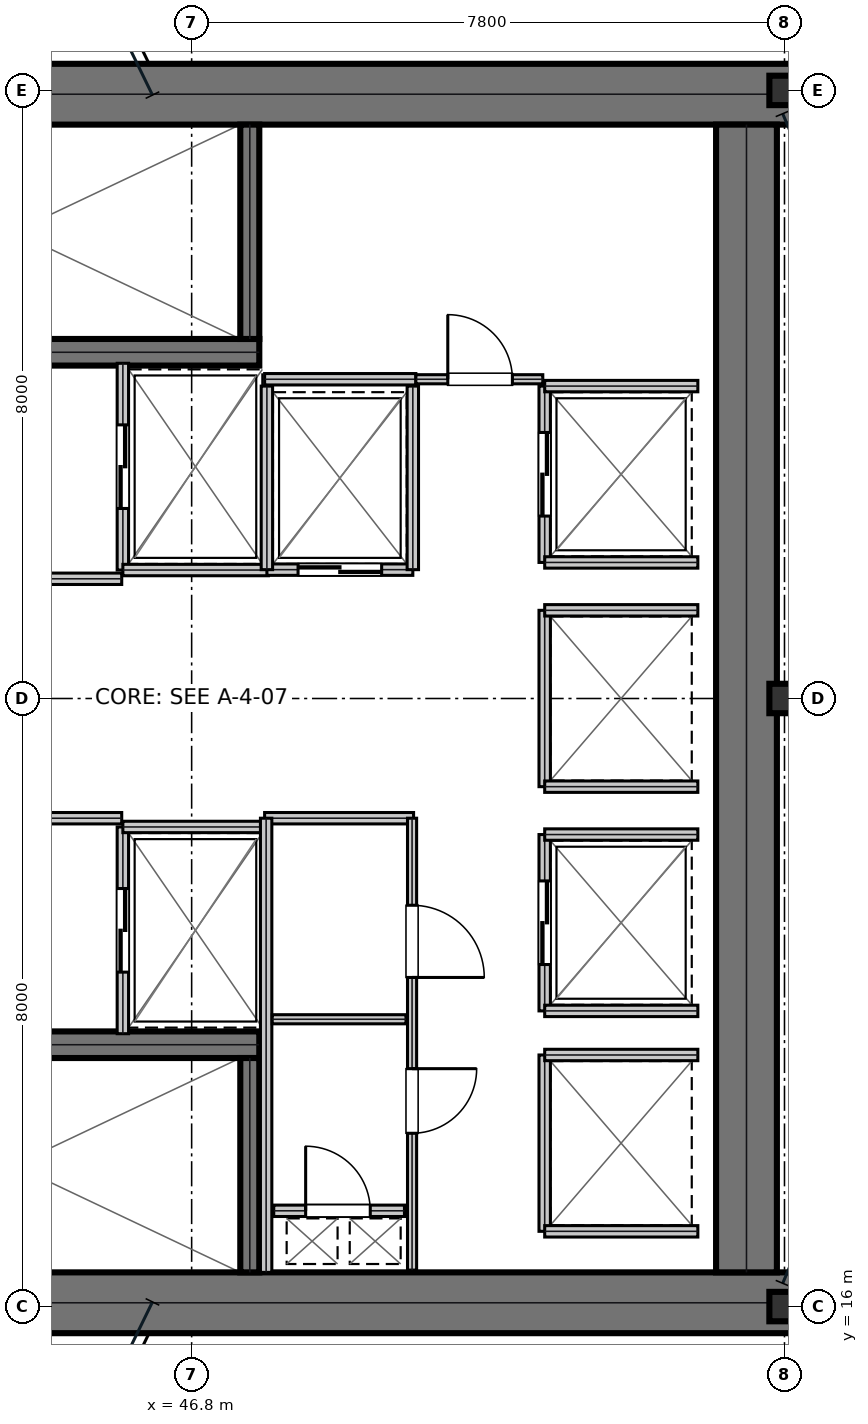
"""IFC4 building model, lengths in metres.
Left out: names, types, materials, properties, quantities, classifications, styles, units other than length and angle.
Written with IfcOpenShell. Run it as: python <this file> out.ifc"""

import sys

from ifc_helpers import new_model, si_unit, direction, frame, frame_2d, origin, origin_2d, place, context, subcontext, project, spatial, rectangle, i_section, extrude, element, fill, save


model = new_model("IFC4")
c1 = context("Model", 3, precision=1e-05, world=origin(), true_north=direction((0.0, 1.0)))
c2 = subcontext(c1, "Body", "Model", "MODEL_VIEW")
j1 = project(units=[si_unit("LENGTHUNIT", "METRE"), si_unit("PLANEANGLEUNIT", "RADIAN")], contexts=[c1])
p1 = place(None, origin())
s1 = spatial("IfcSite", under=j1, at=p1, CompositionType="ELEMENT")
p2 = place(p1, origin())
s2 = spatial("IfcBuilding", under=s1, at=p2, CompositionType="ELEMENT")
p3 = place(p2, frame((0.0, 0.0, 124.95)))
s3 = spatial("IfcBuildingStorey", under=s2, at=p3, CompositionType="ELEMENT", Elevation=124.95)
for number, where, z_axis, x_axis in (
    (1, (38.8, 31.95, 0.0), (0.0, 0.0, 1.0), (1.0, 0.0, 0.0)),
    (2, (38.8, 16.05, 0.0), (0.0, 0.0, 1.0), (1.0, 0.0, 0.0)),
):
    element("IfcWall", number, at=place(p3, frame(where, z_axis=z_axis, x_axis=x_axis)), inside=s3, PredefinedType="SHEAR", context=c2, shape_type="SweptSolid", body=[
        extrude(rectangle(XDim=16.0, YDim=0.8, at=frame_2d((8.0, 0.0))), origin(), (0.0, 0.0, 1.0), 3.81),
    ])
p4 = place(p3, frame((54.1, 16.45, 0.0), z_axis=(0.0, 0.0, 1.0), x_axis=(0.0, 1.0, 0.0)))
e3 = element("IfcWall", 3, at=p4, inside=s3, PredefinedType="SHEAR", context=c2, shape_type="SweptSolid", body=[
    extrude(rectangle(XDim=15.1, YDim=0.8, at=frame_2d((7.55, 0.0))), origin(), (0.0, 0.0, 1.0), 3.81),
])
p5 = place(p3, frame((39.98, 28.555, 0.0), z_axis=(0.0, 0.0, 1.0), x_axis=(1.0, 0.0, 0.0)))
e4 = element("IfcWall", 4, at=p5, inside=s3, PredefinedType="SHEAR", context=c2, shape_type="SweptSolid", body=[
    extrude(rectangle(XDim=7.71, YDim=0.35, at=frame_2d((3.855, 0.0))), origin(), (0.0, 0.0, 1.0), 3.81),
])
p6 = place(p5, frame((0.25, 0.0, 0.0)))
e5 = element("IfcOpeningElement", 5, at=p6, cuts=e4, PredefinedType="OPENING", context=c2, shape_type="SweptSolid", body=[
    extrude(rectangle(XDim=1.1, YDim=2.15, at=frame_2d((0.55, 1.075))), frame((0.0, 0.185, 0.0), z_axis=(0.0, -1.0, 0.0), x_axis=(1.0, 0.0, 0.0)), (0.0, 0.0, 1.0), 0.37),
])
p7 = place(p3, frame((39.98, 19.445, 0.0), z_axis=(0.0, 0.0, 1.0), x_axis=(1.0, 0.0, 0.0)))
e6 = element("IfcWall", 6, at=p7, inside=s3, PredefinedType="SHEAR", context=c2, shape_type="SweptSolid", body=[
    extrude(rectangle(XDim=7.71, YDim=0.35, at=frame_2d((3.855, 0.0))), origin(), (0.0, 0.0, 1.0), 3.81),
])
p8 = place(p7, frame((0.25, 0.0, 0.0)))
e7 = element("IfcOpeningElement", 7, at=p8, cuts=e6, PredefinedType="OPENING", context=c2, shape_type="SweptSolid", body=[
    extrude(rectangle(XDim=1.1, YDim=2.15, at=frame_2d((0.55, 1.075))), frame((0.0, 0.185, 0.0), z_axis=(0.0, -1.0, 0.0), x_axis=(1.0, 0.0, 0.0)), (0.0, 0.0, 1.0), 0.37),
])
for number, where, z_axis, x_axis in (
    (8, (47.565, 28.73, 0.0), (0.0, 0.0, 1.0), (0.0, 1.0, 0.0)),
    (9, (47.565, 16.45, 0.0), (0.0, 0.0, 1.0), (0.0, 1.0, 0.0)),
):
    element("IfcWall", number, at=place(p3, frame(where, z_axis=z_axis, x_axis=x_axis)), inside=s3, PredefinedType="SHEAR", context=c2, shape_type="SweptSolid", body=[
        extrude(rectangle(XDim=2.82, YDim=0.25, at=frame_2d((1.41, 0.0))), origin(), (0.0, 0.0, 1.0), 3.81),
    ])
for number, where, z_axis, x_axis in (
    (10, (54.6, 16.0, 0.0), (0.0, 0.0, 1.0), (1.0, 0.0, 0.0)),
    (11, (54.6, 24.0, 0.0), (0.0, 0.0, 1.0), (1.0, 0.0, 0.0)),
    (12, (54.6, 32.0, 0.0), (0.0, 0.0, 1.0), (1.0, 0.0, 0.0)),
):
    element("IfcColumn", number, at=place(p3, frame(where, z_axis=z_axis, x_axis=x_axis)), inside=s3, PredefinedType="COLUMN", context=c2, shape_type="SweptSolid", body=[
        extrude(i_section(OverallWidth=0.398, OverallDepth=0.387, WebThickness=0.021, FlangeThickness=0.033, at=origin_2d()), origin(), (0.0, 0.0, 1.0), 4.044),
    ])
p9 = place(p3, frame((39.98, 25.575, 0.0), z_axis=(0.0, 0.0, 1.0), x_axis=(1.0, 0.0, 0.0)))
e13 = element("IfcWall", 13, at=p9, inside=s3, PredefinedType="PARTITIONING", context=c2, shape_type="SweptSolid", body=[
    extrude(rectangle(XDim=5.9, YDim=0.15, at=frame_2d((2.95, 0.0))), origin(), (0.0, 0.0, 1.0), 3.81),
])
p10 = place(p9, frame((2.35, 0.0, 0.0)))
e14 = element("IfcOpeningElement", 14, at=p10, cuts=e13, PredefinedType="OPENING", context=c2, shape_type="SweptSolid", body=[
    extrude(rectangle(XDim=1.05, YDim=2.15, at=frame_2d((0.525, 1.075))), frame((0.0, 0.085, 0.0), z_axis=(0.0, -1.0, 0.0), x_axis=(1.0, 0.0, 0.0)), (0.0, 0.0, 1.0), 0.17),
])
p11 = place(p3, frame((39.98, 22.425, 0.0), z_axis=(0.0, 0.0, 1.0), x_axis=(1.0, 0.0, 0.0)))
e15 = element("IfcWall", 15, at=p11, inside=s3, PredefinedType="PARTITIONING", context=c2, shape_type="SweptSolid", body=[
    extrude(rectangle(XDim=5.9, YDim=0.15, at=frame_2d((2.95, 0.0))), origin(), (0.0, 0.0, 1.0), 3.81),
])
p12 = place(p11, frame((2.35, 0.0, 0.0)))
e16 = element("IfcOpeningElement", 16, at=p12, cuts=e15, PredefinedType="OPENING", context=c2, shape_type="SweptSolid", body=[
    extrude(rectangle(XDim=1.05, YDim=2.15, at=frame_2d((0.525, 1.075))), frame((0.0, 0.085, 0.0), z_axis=(0.0, -1.0, 0.0), x_axis=(1.0, 0.0, 0.0)), (0.0, 0.0, 1.0), 0.17),
])
p13 = place(p3, frame((45.895, 25.69, 0.0), z_axis=(0.0, 0.0, 1.0), x_axis=(0.0, 1.0, 0.0)))
e17 = element("IfcWall", 17, at=p13, inside=s3, PredefinedType="PARTITIONING", context=c2, shape_type="SweptSolid", body=[
    extrude(rectangle(XDim=2.72, YDim=0.15, at=frame_2d((1.36, 0.0))), origin(), (0.0, 0.0, 1.0), 3.81),
])
p14 = place(p13, frame((0.81, 0.0, 0.0)))
e18 = element("IfcOpeningElement", 18, at=p14, cuts=e17, PredefinedType="OPENING", context=c2, shape_type="SweptSolid", body=[
    extrude(rectangle(XDim=1.1, YDim=2.15, at=frame_2d((0.55, 1.075))), frame((0.0, 0.085, 0.0), z_axis=(0.0, -1.0, 0.0), x_axis=(1.0, 0.0, 0.0)), (0.0, 0.0, 1.0), 0.17),
])
p15 = place(p3, frame((45.895, 25.69, 0.0), z_axis=(0.0, 0.0, 1.0), x_axis=(1.0, 0.0, 0.0)))
e19 = element("IfcWall", 19, at=p15, inside=s3, PredefinedType="PARTITIONING", context=c2, shape_type="SweptSolid", body=[
    extrude(rectangle(XDim=1.915, YDim=0.15, at=frame_2d((0.958, 0.0))), origin(), (0.0, 0.0, 1.0), 3.81),
])
p16 = place(p3, frame((45.895, 19.59, 0.0), z_axis=(0.0, 0.0, 1.0), x_axis=(0.0, 1.0, 0.0)))
e20 = element("IfcWall", 20, at=p16, inside=s3, PredefinedType="PARTITIONING", context=c2, shape_type="SweptSolid", body=[
    extrude(rectangle(XDim=2.72, YDim=0.15, at=frame_2d((1.36, 0.0))), origin(), (0.0, 0.0, 1.0), 3.81),
])
p17 = place(p16, frame((0.81, 0.0, 0.0)))
e21 = element("IfcOpeningElement", 21, at=p17, cuts=e20, PredefinedType="OPENING", context=c2, shape_type="SweptSolid", body=[
    extrude(rectangle(XDim=1.1, YDim=2.15, at=frame_2d((0.55, 1.075))), frame((0.0, 0.085, 0.0), z_axis=(0.0, -1.0, 0.0), x_axis=(1.0, 0.0, 0.0)), (0.0, 0.0, 1.0), 0.17),
])
p18 = place(p3, frame((45.895, 22.31, 0.0), z_axis=(0.0, 0.0, 1.0), x_axis=(1.0, 0.0, 0.0)))
e22 = element("IfcWall", 22, at=p18, inside=s3, PredefinedType="PARTITIONING", context=c2, shape_type="SweptSolid", body=[
    extrude(rectangle(XDim=1.915, YDim=0.15, at=frame_2d((0.958, 0.0))), origin(), (0.0, 0.0, 1.0), 3.81),
])
p19 = place(p3, frame((47.79, 25.695, 0.0), z_axis=(0.0, 0.0, 1.0), x_axis=(1.0, 0.0, 0.0)))
e23 = element("IfcWall", 23, at=p19, inside=s3, PredefinedType="PARTITIONING", context=c2, shape_type="SweptSolid", body=[
    extrude(rectangle(XDim=1.92, YDim=0.15, at=frame_2d((0.96, 0.0))), origin(), (0.0, 0.0, 1.0), 3.81),
])
p20 = place(p19, frame((0.41, 0.0, 0.0)))
e24 = element("IfcOpeningElement", 24, at=p20, cuts=e23, PredefinedType="OPENING", context=c2, shape_type="SweptSolid", body=[
    extrude(rectangle(XDim=1.1, YDim=2.15, at=frame_2d((0.55, 1.075))), frame((0.0, 0.085, 0.0), z_axis=(0.0, -1.0, 0.0), x_axis=(1.0, 0.0, 0.0)), (0.0, 0.0, 1.0), 0.17),
])
for number, where, z_axis, x_axis in (
    (25, (47.79, 25.695, 0.0), (0.0, 0.0, 1.0), (0.0, 1.0, 0.0)),
    (26, (49.71, 25.695, 0.0), (0.0, 0.0, 1.0), (0.0, 1.0, 0.0)),
):
    element("IfcWall", number, at=place(p3, frame(where, z_axis=z_axis, x_axis=x_axis)), inside=s3, PredefinedType="PARTITIONING", context=c2, shape_type="SweptSolid", body=[
        extrude(rectangle(XDim=2.415, YDim=0.15, at=frame_2d((1.208, 0.0))), origin(), (0.0, 0.0, 1.0), 3.81),
    ])
p21 = place(p3, frame((51.445, 25.79, 0.0), z_axis=(0.0, 0.0, 1.0), x_axis=(0.0, 1.0, 0.0)))
e27 = element("IfcWall", 27, at=p21, inside=s3, PredefinedType="PARTITIONING", context=c2, shape_type="SweptSolid", body=[
    extrude(rectangle(XDim=2.32, YDim=0.15, at=frame_2d((1.16, 0.0))), origin(), (0.0, 0.0, 1.0), 3.81),
])
p22 = place(p21, frame((0.61, 0.0, 0.0)))
e28 = element("IfcOpeningElement", 28, at=p22, cuts=e27, PredefinedType="OPENING", context=c2, shape_type="SweptSolid", body=[
    extrude(rectangle(XDim=1.1, YDim=2.15, at=frame_2d((0.55, 1.075))), frame((0.0, 0.085, 0.0), z_axis=(0.0, -1.0, 0.0), x_axis=(1.0, 0.0, 0.0)), (0.0, 0.0, 1.0), 0.17),
])
for number, where, z_axis, x_axis in (
    (29, (51.445, 25.79, 0.0), (0.0, 0.0, 1.0), (1.0, 0.0, 0.0)),
    (30, (51.445, 28.11, 0.0), (0.0, 0.0, 1.0), (1.0, 0.0, 0.0)),
):
    element("IfcWall", number, at=place(p3, frame(where, z_axis=z_axis, x_axis=x_axis)), inside=s3, PredefinedType="PARTITIONING", context=c2, shape_type="SweptSolid", body=[
        extrude(rectangle(XDim=2.015, YDim=0.15, at=frame_2d((1.007, 0.0))), origin(), (0.0, 0.0, 1.0), 3.81),
    ])
p23 = place(p3, frame((51.445, 19.89, 0.0), z_axis=(0.0, 0.0, 1.0), x_axis=(0.0, 1.0, 0.0)))
e31 = element("IfcWall", 31, at=p23, inside=s3, PredefinedType="PARTITIONING", context=c2, shape_type="SweptSolid", body=[
    extrude(rectangle(XDim=2.32, YDim=0.15, at=frame_2d((1.16, 0.0))), origin(), (0.0, 0.0, 1.0), 3.81),
])
p24 = place(p23, frame((0.61, 0.0, 0.0)))
e32 = element("IfcOpeningElement", 32, at=p24, cuts=e31, PredefinedType="OPENING", context=c2, shape_type="SweptSolid", body=[
    extrude(rectangle(XDim=1.1, YDim=2.15, at=frame_2d((0.55, 1.075))), frame((0.0, 0.085, 0.0), z_axis=(0.0, -1.0, 0.0), x_axis=(1.0, 0.0, 0.0)), (0.0, 0.0, 1.0), 0.17),
])
for number, where, z_axis, x_axis in (
    (33, (51.445, 19.89, 0.0), (0.0, 0.0, 1.0), (1.0, 0.0, 0.0)),
    (34, (51.445, 22.21, 0.0), (0.0, 0.0, 1.0), (1.0, 0.0, 0.0)),
):
    element("IfcWall", number, at=place(p3, frame(where, z_axis=z_axis, x_axis=x_axis)), inside=s3, PredefinedType="PARTITIONING", context=c2, shape_type="SweptSolid", body=[
        extrude(rectangle(XDim=2.015, YDim=0.15, at=frame_2d((1.007, 0.0))), origin(), (0.0, 0.0, 1.0), 3.81),
    ])
p25 = place(p3, frame((51.445, 22.84, 0.0), z_axis=(0.0, 0.0, 1.0), x_axis=(0.0, 1.0, 0.0)))
e35 = element("IfcWall", 35, at=p25, inside=s3, PredefinedType="PARTITIONING", context=c2, shape_type="SweptSolid", body=[
    extrude(rectangle(XDim=2.32, YDim=0.15, at=frame_2d((1.16, 0.0))), origin(), (0.0, 0.0, 1.0), 3.81),
])
for number, where, z_axis, x_axis in (
    (36, (51.445, 22.84, 0.0), (0.0, 0.0, 1.0), (1.0, 0.0, 0.0)),
    (37, (51.445, 25.16, 0.0), (0.0, 0.0, 1.0), (1.0, 0.0, 0.0)),
):
    element("IfcWall", number, at=place(p3, frame(where, z_axis=z_axis, x_axis=x_axis)), inside=s3, PredefinedType="PARTITIONING", context=c2, shape_type="SweptSolid", body=[
        extrude(rectangle(XDim=2.015, YDim=0.15, at=frame_2d((1.007, 0.0))), origin(), (0.0, 0.0, 1.0), 3.81),
    ])
p26 = place(p3, frame((51.445, 16.99, 0.0), z_axis=(0.0, 0.0, 1.0), x_axis=(0.0, 1.0, 0.0)))
e38 = element("IfcWall", 38, at=p26, inside=s3, PredefinedType="PARTITIONING", context=c2, shape_type="SweptSolid", body=[
    extrude(rectangle(XDim=2.32, YDim=0.15, at=frame_2d((1.16, 0.0))), origin(), (0.0, 0.0, 1.0), 3.81),
])
for number, where, z_axis, x_axis in (
    (39, (51.445, 16.99, 0.0), (0.0, 0.0, 1.0), (1.0, 0.0, 0.0)),
    (40, (51.445, 19.31, 0.0), (0.0, 0.0, 1.0), (1.0, 0.0, 0.0)),
):
    element("IfcWall", number, at=place(p3, frame(where, z_axis=z_axis, x_axis=x_axis)), inside=s3, PredefinedType="PARTITIONING", context=c2, shape_type="SweptSolid", body=[
        extrude(rectangle(XDim=2.015, YDim=0.15, at=frame_2d((1.007, 0.0))), origin(), (0.0, 0.0, 1.0), 3.81),
    ])
p27 = place(p3, frame((47.88, 17.26, 0.0), z_axis=(0.0, 0.0, 1.0), x_axis=(1.0, 0.0, 0.0)))
e41 = element("IfcWall", 41, at=p27, inside=s3, PredefinedType="PARTITIONING", context=c2, shape_type="SweptSolid", body=[
    extrude(rectangle(XDim=1.72, YDim=0.15, at=frame_2d((0.86, 0.0))), origin(), (0.0, 0.0, 1.0), 3.81),
])
p28 = place(p27, frame((0.42, 0.0, 0.0)))
e42 = element("IfcOpeningElement", 42, at=p28, cuts=e41, PredefinedType="OPENING", context=c2, shape_type="SweptSolid", body=[
    extrude(rectangle(XDim=0.85, YDim=2.15, at=frame_2d((0.425, 1.075))), frame((0.0, 0.085, 0.0), z_axis=(0.0, -1.0, 0.0), x_axis=(1.0, 0.0, 0.0)), (0.0, 0.0, 1.0), 0.17),
])
p29 = place(p3, frame((47.76, 22.425, 0.0), z_axis=(0.0, 0.0, 1.0), x_axis=(1.0, 0.0, 0.0)))
e43 = element("IfcWall", 43, at=p29, inside=s3, PredefinedType="PARTITIONING", context=c2, shape_type="SweptSolid", body=[
    extrude(rectangle(XDim=1.96, YDim=0.15, at=frame_2d((0.98, 0.0))), origin(), (0.0, 0.0, 1.0), 3.81),
])
p30 = place(p3, frame((47.78, 16.45, 0.0), z_axis=(0.0, 0.0, 1.0), x_axis=(0.0, 1.0, 0.0)))
e44 = element("IfcWall", 44, at=p30, inside=s3, PredefinedType="PARTITIONING", context=c2, shape_type="SweptSolid", body=[
    extrude(rectangle(XDim=5.975, YDim=0.15, at=frame_2d((2.988, 0.0))), origin(), (0.0, 0.0, 1.0), 3.81),
])
p31 = place(p3, frame((47.86, 19.78, 0.0), z_axis=(0.0, 0.0, 1.0), x_axis=(1.0, 0.0, 0.0)))
e45 = element("IfcWall", 45, at=p31, inside=s3, PredefinedType="PARTITIONING", context=c2, shape_type="SweptSolid", body=[
    extrude(rectangle(XDim=1.76, YDim=0.12, at=frame_2d((0.88, 0.0))), origin(), (0.0, 0.0, 1.0), 3.81),
])
p32 = place(p3, frame((49.7, 16.48, 0.0), z_axis=(0.0, 0.0, 1.0), x_axis=(0.0, 1.0, 0.0)))
e46 = element("IfcWall", 46, at=p32, inside=s3, PredefinedType="PARTITIONING", context=c2, shape_type="SweptSolid", body=[
    extrude(rectangle(XDim=5.945, YDim=0.12, at=frame_2d((2.973, 0.0))), origin(), (0.0, 0.0, 1.0), 3.81),
])
p33 = place(p32, frame((1.8, 0.0, 0.0)))
e47 = element("IfcOpeningElement", 47, at=p33, cuts=e46, PredefinedType="OPENING", context=c2, shape_type="SweptSolid", body=[
    extrude(rectangle(XDim=0.85, YDim=2.15, at=frame_2d((0.425, 1.075))), frame((0.0, 0.07, 0.0), z_axis=(0.0, -1.0, 0.0), x_axis=(1.0, 0.0, 0.0)), (0.0, 0.0, 1.0), 0.14),
])
p34 = place(p32, frame((3.85, 0.0, 0.0)))
e48 = element("IfcOpeningElement", 48, at=p34, cuts=e46, PredefinedType="OPENING", context=c2, shape_type="SweptSolid", body=[
    extrude(rectangle(XDim=0.95, YDim=2.15, at=frame_2d((0.475, 1.075))), frame((0.0, 0.07, 0.0), z_axis=(0.0, -1.0, 0.0), x_axis=(1.0, 0.0, 0.0)), (0.0, 0.0, 1.0), 0.14),
])
p35 = place(p3, frame((47.76, 28.2, 0.0), z_axis=(0.0, 0.0, 1.0), x_axis=(1.0, 0.0, 0.0)))
e49 = element("IfcWall", 49, at=p35, inside=s3, PredefinedType="PARTITIONING", context=c2, shape_type="SweptSolid", body=[
    extrude(rectangle(XDim=1.99, YDim=0.15, at=frame_2d((0.995, 0.0))), origin(), (0.0, 0.0, 1.0), 3.81),
])
p36 = place(p3, frame((49.75, 28.2, 0.0), z_axis=(0.0, 0.0, 1.0), x_axis=(1.0, 0.0, 0.0)))
e50 = element("IfcWall", 50, at=p36, inside=s3, PredefinedType="PARTITIONING", context=c2, shape_type="SweptSolid", body=[
    extrude(rectangle(XDim=1.67, YDim=0.12, at=frame_2d((0.835, 0.0))), origin(), (0.0, 0.0, 1.0), 3.81),
])
p37 = place(p36, frame((0.42, 0.0, 0.0)))
e51 = element("IfcOpeningElement", 51, at=p37, cuts=e50, PredefinedType="OPENING", context=c2, shape_type="SweptSolid", body=[
    extrude(rectangle(XDim=0.85, YDim=2.15, at=frame_2d((0.425, 1.075))), frame((0.0, 0.07, 0.0), z_axis=(0.0, -1.0, 0.0), x_axis=(1.0, 0.0, 0.0)), (0.0, 0.0, 1.0), 0.14),
])
p38 = place(p14, frame((1.1, 0.0, 0.0), z_axis=(0.0, 0.0, 1.0), x_axis=(-1.0, 0.0, 0.0)))
e52 = element("IfcDoor", 52, at=p38, inside=s3, OperationType="DOUBLE_DOOR_SLIDING", PredefinedType="DOOR", context=c2, shape_type="SweptSolid", body=[
    extrude(rectangle(XDim=1.1, YDim=2.15, at=frame_2d((0.55, 1.075))), frame((0.0, 0.025, 0.0), z_axis=(0.0, -1.0, 0.0), x_axis=(1.0, 0.0, 0.0)), (0.0, 0.0, 1.0), 0.05),
])
fill(e18, e52)
p39 = place(p17, frame((1.1, 0.0, 0.0), z_axis=(0.0, 0.0, 1.0), x_axis=(-1.0, 0.0, 0.0)))
e53 = element("IfcDoor", 53, at=p39, inside=s3, OperationType="DOUBLE_DOOR_SLIDING", PredefinedType="DOOR", context=c2, shape_type="SweptSolid", body=[
    extrude(rectangle(XDim=1.1, YDim=2.15, at=frame_2d((0.55, 1.075))), frame((0.0, 0.025, 0.0), z_axis=(0.0, -1.0, 0.0), x_axis=(1.0, 0.0, 0.0)), (0.0, 0.0, 1.0), 0.05),
])
fill(e21, e53)
p40 = place(p20, frame((1.1, 0.0, 0.0), z_axis=(0.0, 0.0, 1.0), x_axis=(-1.0, 0.0, 0.0)))
e54 = element("IfcDoor", 54, at=p40, inside=s3, OperationType="DOUBLE_DOOR_SLIDING", PredefinedType="DOOR", context=c2, shape_type="SweptSolid", body=[
    extrude(rectangle(XDim=1.1, YDim=2.15, at=frame_2d((0.55, 1.075))), frame((0.0, 0.025, 0.0), z_axis=(0.0, -1.0, 0.0), x_axis=(1.0, 0.0, 0.0)), (0.0, 0.0, 1.0), 0.05),
])
fill(e24, e54)
p41 = place(p22, frame((1.1, 0.0, 0.0), z_axis=(0.0, 0.0, 1.0), x_axis=(-1.0, 0.0, 0.0)))
e55 = element("IfcDoor", 55, at=p41, inside=s3, OperationType="DOUBLE_DOOR_SLIDING", PredefinedType="DOOR", context=c2, shape_type="SweptSolid", body=[
    extrude(rectangle(XDim=1.1, YDim=2.15, at=frame_2d((0.55, 1.075))), frame((0.0, 0.025, 0.0), z_axis=(0.0, -1.0, 0.0), x_axis=(1.0, 0.0, 0.0)), (0.0, 0.0, 1.0), 0.05),
])
fill(e28, e55)
p42 = place(p24, frame((1.1, 0.0, 0.0), z_axis=(0.0, 0.0, 1.0), x_axis=(-1.0, 0.0, 0.0)))
e56 = element("IfcDoor", 56, at=p42, inside=s3, OperationType="DOUBLE_DOOR_SLIDING", PredefinedType="DOOR", context=c2, shape_type="SweptSolid", body=[
    extrude(rectangle(XDim=1.1, YDim=2.15, at=frame_2d((0.55, 1.075))), frame((0.0, 0.025, 0.0), z_axis=(0.0, -1.0, 0.0), x_axis=(1.0, 0.0, 0.0)), (0.0, 0.0, 1.0), 0.05),
])
fill(e32, e56)
p43 = place(p28, origin())
e57 = element("IfcDoor", 57, at=p43, inside=s3, OperationType="SINGLE_SWING_LEFT", PredefinedType="TRAPDOOR", context=c2, shape_type="SweptSolid", body=[
    extrude(rectangle(XDim=0.85, YDim=2.15, at=frame_2d((0.425, 1.075))), frame((0.0, 0.025, 0.0), z_axis=(0.0, -1.0, 0.0), x_axis=(1.0, 0.0, 0.0)), (0.0, 0.0, 1.0), 0.05),
])
fill(e42, e57)
p44 = place(p33, frame((0.85, 0.0, 0.0), z_axis=(0.0, 0.0, 1.0), x_axis=(-1.0, 0.0, 0.0)))
e58 = element("IfcDoor", 58, at=p44, inside=s3, OperationType="SINGLE_SWING_LEFT", PredefinedType="DOOR", context=c2, shape_type="SweptSolid", body=[
    extrude(rectangle(XDim=0.85, YDim=2.15, at=frame_2d((0.425, 1.075))), frame((0.0, 0.025, 0.0), z_axis=(0.0, -1.0, 0.0), x_axis=(1.0, 0.0, 0.0)), (0.0, 0.0, 1.0), 0.05),
])
fill(e47, e58)
p45 = place(p34, frame((0.95, 0.0, 0.0), z_axis=(0.0, 0.0, 1.0), x_axis=(-1.0, 0.0, 0.0)))
e59 = element("IfcDoor", 59, at=p45, inside=s3, OperationType="SINGLE_SWING_RIGHT", PredefinedType="DOOR", context=c2, shape_type="SweptSolid", body=[
    extrude(rectangle(XDim=0.95, YDim=2.15, at=frame_2d((0.475, 1.075))), frame((0.0, 0.025, 0.0), z_axis=(0.0, -1.0, 0.0), x_axis=(1.0, 0.0, 0.0)), (0.0, 0.0, 1.0), 0.05),
])
fill(e48, e59)
p46 = place(p37, origin())
e60 = element("IfcDoor", 60, at=p46, inside=s3, OperationType="SINGLE_SWING_LEFT", PredefinedType="DOOR", context=c2, shape_type="SweptSolid", body=[
    extrude(rectangle(XDim=0.85, YDim=2.15, at=frame_2d((0.425, 1.075))), frame((0.0, 0.025, 0.0), z_axis=(0.0, -1.0, 0.0), x_axis=(1.0, 0.0, 0.0)), (0.0, 0.0, 1.0), 0.05),
])
fill(e51, e60)
save(model, sys.argv[1])
